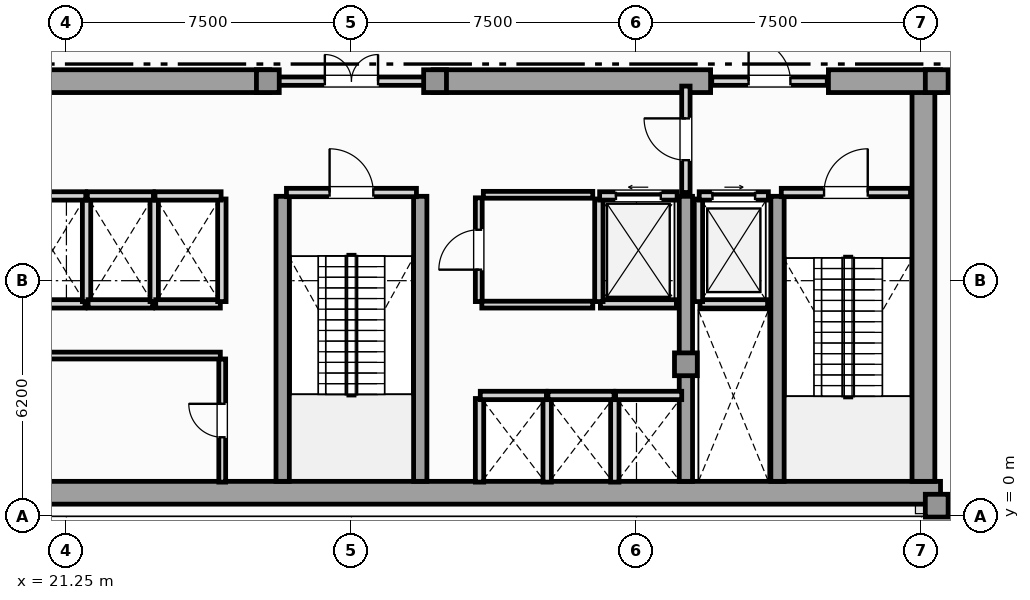
"""IFC4 building model, lengths in metres.
Left out: names, types, materials, properties, quantities, classifications, styles, units other than length and angle.
Written with IfcOpenShell. Run it as: python <this file> out.ifc"""

import sys

from ifc_helpers import new_model, si_unit, direction, frame, frame_2d, origin, origin_2d, place, context, subcontext, project, spatial, rectangle, extrude, element, fill, save


model = new_model("IFC4")
c1 = context("Model", 3, precision=1e-05, world=origin(), true_north=direction((0.0, 1.0)))
c2 = subcontext(c1, "Body", "Model", "MODEL_VIEW")
j1 = project(units=[si_unit("LENGTHUNIT", "METRE"), si_unit("PLANEANGLEUNIT", "RADIAN")], contexts=[c1])
p1 = place(None, origin())
s1 = spatial("IfcSite", under=j1, at=p1, CompositionType="ELEMENT")
p2 = place(p1, origin())
s2 = spatial("IfcBuilding", under=s1, at=p2, CompositionType="ELEMENT")
p3 = place(p2, frame((0.0, 0.0, 246.5)))
s3 = spatial("IfcBuildingStorey", under=s2, at=p3, CompositionType="ELEMENT", Elevation=246.5)
p4 = place(p3, frame((13.25, 0.62, 0.0), z_axis=(0.0, 0.0, 1.0), x_axis=(1.0, 0.0, 0.0)))
e1 = element("IfcWall", 1, at=p4, inside=s3, PredefinedType="SHEAR", context=c2, shape_type="SweptSolid", body=[
    extrude(rectangle(XDim=31.0, YDim=0.6, at=frame_2d((15.5, 0.0))), origin(), (0.0, 0.0, 1.0), 4.92),
])
p5 = place(p3, frame((43.8, 0.92, 0.0), z_axis=(0.0, 0.0, 1.0), x_axis=(0.0, 1.0, 0.0)))
e2 = element("IfcWall", 2, at=p5, inside=s3, PredefinedType="SHEAR", context=c2, shape_type="SweptSolid", body=[
    extrude(rectangle(XDim=10.53, YDim=0.6, at=frame_2d((5.265, 0.0))), origin(), (0.0, 0.0, 1.0), 4.92),
])
for number, where, z_axis, x_axis in (
    (3, (19.3, 11.45, 0.0), (0.0, 0.0, 1.0), (1.0, 0.0, 0.0)),
    (4, (30.9, 11.45, 0.0), (0.0, 0.0, 1.0), (1.0, 0.0, 0.0)),
):
    element("IfcWall", number, at=place(p3, frame(where, z_axis=z_axis, x_axis=x_axis)), inside=s3, PredefinedType="SHEAR", context=c2, shape_type="SweptSolid", body=[
        extrude(rectangle(XDim=7.3, YDim=0.6, at=frame_2d((3.65, 0.0))), origin(), (0.0, 0.0, 1.0), 4.92),
    ])
p6 = place(p3, frame((41.3, 11.45, 0.0), z_axis=(0.0, 0.0, 1.0), x_axis=(1.0, 0.0, 0.0)))
e5 = element("IfcWall", 5, at=p6, inside=s3, PredefinedType="SHEAR", context=c2, shape_type="SweptSolid", body=[
    extrude(rectangle(XDim=2.95, YDim=0.6, at=frame_2d((1.475, 0.0))), origin(), (0.0, 0.0, 1.0), 4.92),
])
for number, where, z_axis, x_axis in (
    (6, (26.94, 0.92, 0.0), (0.0, 0.0, 1.0), (0.0, 1.0, 0.0)),
    (7, (30.56, 0.92, 0.0), (0.0, 0.0, 1.0), (0.0, 1.0, 0.0)),
    (8, (37.55, 0.92, 0.0), (0.0, 0.0, 1.0), (0.0, 1.0, 0.0)),
    (9, (39.96, 0.92, 0.0), (0.0, 0.0, 1.0), (0.0, 1.0, 0.0)),
):
    element("IfcWall", number, at=place(p3, frame(where, z_axis=z_axis, x_axis=x_axis)), inside=s3, PredefinedType="SHEAR", context=c2, shape_type="SweptSolid", body=[
        extrude(rectangle(XDim=7.5, YDim=0.35, at=frame_2d((3.75, 0.0))), origin(), (0.0, 0.0, 1.0), 4.92),
    ])
for number, where, z_axis, x_axis in (
    (10, (44.15, 0.28, 0.0), (0.0, 0.0, 1.0), (1.0, 0.0, 0.0)),
    (11, (44.15, 11.45, 0.0), (0.0, 0.0, 1.0), (1.0, 0.0, 0.0)),
    (12, (37.55, 4.0, 0.0), (0.0, 0.0, 1.0), (1.0, 0.0, 0.0)),
    (13, (26.55, 11.45, 0.0), (0.0, 0.0, 1.0), (1.0, 0.0, 0.0)),
    (14, (30.95, 11.45, 0.0), (0.0, 0.0, 1.0), (1.0, 0.0, 0.0)),
):
    element("IfcColumn", number, at=place(p3, frame(where, z_axis=z_axis, x_axis=x_axis)), inside=s3, PredefinedType="COLUMN", context=c2, shape_type="SweptSolid", body=[
        extrude(rectangle(XDim=0.6, YDim=0.6, at=origin_2d()), origin(), (0.0, 0.0, 1.0), 5.2),
    ])
p7 = place(p3, frame((44.25, 0.18, 0.0), z_axis=(0.0, 0.0, 1.0), x_axis=(1.0, 0.0, 0.0)))
e15 = element("IfcWall", 15, at=p7, inside=s3, PredefinedType="SOLIDWALL", context=c2, shape_type="SweptSolid", body=[
    extrude(rectangle(XDim=2.226, YDim=0.26, at=frame_2d((1.113, 0.0))), origin(), (0.0, 0.0, 1.0), 4.92),
])
p8 = place(p3, frame((37.92, 5.59, 0.0), z_axis=(0.0, 0.0, 1.0), x_axis=(1.0, 0.0, 0.0)))
e16 = element("IfcWall", 16, at=p8, inside=s3, PredefinedType="SOLIDWALL", context=c2, shape_type="SweptSolid", body=[
    extrude(rectangle(XDim=1.78, YDim=0.22, at=frame_2d((0.89, 0.0))), origin(), (0.0, 0.0, 1.0), 4.92),
])
p9 = place(p3, frame((37.88, 5.65, 0.0), z_axis=(0.0, 0.0, 1.0), x_axis=(0.0, 1.0, 0.0)))
e17 = element("IfcWall", 17, at=p9, inside=s3, PredefinedType="SOLIDWALL", context=c2, shape_type="SweptSolid", body=[
    extrude(rectangle(XDim=2.7, YDim=0.22, at=frame_2d((1.35, 0.0))), origin(), (0.0, 0.0, 1.0), 4.92),
])
p10 = place(p3, frame((37.9, 8.43, 0.0), z_axis=(0.0, 0.0, 1.0), x_axis=(1.0, 0.0, 0.0)))
e18 = element("IfcWall", 18, at=p10, inside=s3, PredefinedType="SOLIDWALL", context=c2, shape_type="SweptSolid", body=[
    extrude(rectangle(XDim=1.82, YDim=0.22, at=frame_2d((0.91, 0.0))), origin(), (0.0, 0.0, 1.0), 4.92),
])
p11 = place(p10, frame((0.35, 0.0, 0.0)))
e19 = element("IfcOpeningElement", 19, at=p11, cuts=e18, PredefinedType="OPENING", context=c2, shape_type="SweptSolid", body=[
    extrude(rectangle(XDim=1.12, YDim=2.25, at=frame_2d((0.56, 1.125))), frame((0.0, 0.12, 0.0), z_axis=(0.0, -1.0, 0.0), x_axis=(1.0, 0.0, 0.0)), (0.0, 0.0, 1.0), 0.24),
])
p12 = place(p3, frame((35.3, 5.59, 0.0), z_axis=(0.0, 0.0, 1.0), x_axis=(1.0, 0.0, 0.0)))
e20 = element("IfcWall", 20, at=p12, inside=s3, PredefinedType="SOLIDWALL", context=c2, shape_type="SweptSolid", body=[
    extrude(rectangle(XDim=2.0, YDim=0.22, at=frame_2d((1.0, 0.0))), origin(), (0.0, 0.0, 1.0), 4.92),
])
p13 = place(p3, frame((35.26, 5.65, 0.0), z_axis=(0.0, 0.0, 1.0), x_axis=(0.0, 1.0, 0.0)))
e21 = element("IfcWall", 21, at=p13, inside=s3, PredefinedType="SOLIDWALL", context=c2, shape_type="SweptSolid", body=[
    extrude(rectangle(XDim=2.7, YDim=0.22, at=frame_2d((1.35, 0.0))), origin(), (0.0, 0.0, 1.0), 4.92),
])
p14 = place(p3, frame((35.28, 8.43, 0.0), z_axis=(0.0, 0.0, 1.0), x_axis=(1.0, 0.0, 0.0)))
e22 = element("IfcWall", 22, at=p14, inside=s3, PredefinedType="SOLIDWALL", context=c2, shape_type="SweptSolid", body=[
    extrude(rectangle(XDim=2.04, YDim=0.22, at=frame_2d((1.02, 0.0))), origin(), (0.0, 0.0, 1.0), 4.92),
])
p15 = place(p14, frame((0.43, 0.0, 0.0)))
e23 = element("IfcOpeningElement", 23, at=p15, cuts=e22, PredefinedType="OPENING", context=c2, shape_type="SweptSolid", body=[
    extrude(rectangle(XDim=1.18, YDim=2.2, at=frame_2d((0.59, 1.1))), frame((0.0, 0.12, 0.0), z_axis=(0.0, -1.0, 0.0), x_axis=(1.0, 0.0, 0.0)), (0.0, 0.0, 1.0), 0.24),
])
for number, where, z_axis, x_axis in (
    (24, (32.12, 0.9, 0.0), (0.0, 0.0, 1.0), (0.0, 1.0, 0.0)),
    (25, (33.9, 0.9, 0.0), (0.0, 0.0, 1.0), (0.0, 1.0, 0.0)),
):
    element("IfcWall", number, at=place(p3, frame(where, z_axis=z_axis, x_axis=x_axis)), inside=s3, PredefinedType="SOLIDWALL", context=c2, shape_type="SweptSolid", body=[
        extrude(rectangle(XDim=2.2, YDim=0.22, at=frame_2d((1.1, 0.0))), origin(), (0.0, 0.0, 1.0), 4.92),
    ])
p16 = place(p3, frame((32.14, 3.18, 0.0), z_axis=(0.0, 0.0, 1.0), x_axis=(1.0, 0.0, 0.0)))
e26 = element("IfcWall", 26, at=p16, inside=s3, PredefinedType="SOLIDWALL", context=c2, shape_type="SweptSolid", body=[
    extrude(rectangle(XDim=1.74, YDim=0.22, at=frame_2d((0.87, 0.0))), origin(), (0.0, 0.0, 1.0), 4.92),
])
p17 = place(p3, frame((35.68, 0.9, 0.0), z_axis=(0.0, 0.0, 1.0), x_axis=(0.0, 1.0, 0.0)))
e27 = element("IfcWall", 27, at=p17, inside=s3, PredefinedType="SOLIDWALL", context=c2, shape_type="SweptSolid", body=[
    extrude(rectangle(XDim=2.2, YDim=0.22, at=frame_2d((1.1, 0.0))), origin(), (0.0, 0.0, 1.0), 4.92),
])
for number, where, z_axis, x_axis in (
    (28, (33.92, 3.18, 0.0), (0.0, 0.0, 1.0), (1.0, 0.0, 0.0)),
    (29, (35.7, 3.18, 0.0), (0.0, 0.0, 1.0), (1.0, 0.0, 0.0)),
):
    element("IfcWall", number, at=place(p3, frame(where, z_axis=z_axis, x_axis=x_axis)), inside=s3, PredefinedType="SOLIDWALL", context=c2, shape_type="SweptSolid", body=[
        extrude(rectangle(XDim=1.74, YDim=0.22, at=frame_2d((0.87, 0.0))), origin(), (0.0, 0.0, 1.0), 4.92),
    ])
p18 = place(p3, frame((20.04, 5.59, 0.0), z_axis=(0.0, 0.0, 1.0), x_axis=(1.0, 0.0, 0.0)))
e30 = element("IfcWall", 30, at=p18, inside=s3, PredefinedType="SOLIDWALL", context=c2, shape_type="SweptSolid", body=[
    extrude(rectangle(XDim=1.7, YDim=0.22, at=frame_2d((0.85, 0.0))), origin(), (0.0, 0.0, 1.0), 4.92),
])
p19 = place(p3, frame((21.78, 5.65, 0.0), z_axis=(0.0, 0.0, 1.0), x_axis=(0.0, 1.0, 0.0)))
e31 = element("IfcWall", 31, at=p19, inside=s3, PredefinedType="SOLIDWALL", context=c2, shape_type="SweptSolid", body=[
    extrude(rectangle(XDim=2.7, YDim=0.22, at=frame_2d((1.35, 0.0))), origin(), (0.0, 0.0, 1.0), 4.92),
])
p20 = place(p3, frame((20.02, 8.43, 0.0), z_axis=(0.0, 0.0, 1.0), x_axis=(1.0, 0.0, 0.0)))
e32 = element("IfcWall", 32, at=p20, inside=s3, PredefinedType="SOLIDWALL", context=c2, shape_type="SweptSolid", body=[
    extrude(rectangle(XDim=1.74, YDim=0.22, at=frame_2d((0.87, 0.0))), origin(), (0.0, 0.0, 1.0), 4.92),
])
p21 = place(p3, frame((21.82, 5.59, 0.0), z_axis=(0.0, 0.0, 1.0), x_axis=(1.0, 0.0, 0.0)))
e33 = element("IfcWall", 33, at=p21, inside=s3, PredefinedType="SOLIDWALL", context=c2, shape_type="SweptSolid", body=[
    extrude(rectangle(XDim=1.7, YDim=0.22, at=frame_2d((0.85, 0.0))), origin(), (0.0, 0.0, 1.0), 4.92),
])
p22 = place(p3, frame((23.56, 5.65, 0.0), z_axis=(0.0, 0.0, 1.0), x_axis=(0.0, 1.0, 0.0)))
e34 = element("IfcWall", 34, at=p22, inside=s3, PredefinedType="SOLIDWALL", context=c2, shape_type="SweptSolid", body=[
    extrude(rectangle(XDim=2.7, YDim=0.22, at=frame_2d((1.35, 0.0))), origin(), (0.0, 0.0, 1.0), 4.92),
])
p23 = place(p3, frame((21.8, 8.43, 0.0), z_axis=(0.0, 0.0, 1.0), x_axis=(1.0, 0.0, 0.0)))
e35 = element("IfcWall", 35, at=p23, inside=s3, PredefinedType="SOLIDWALL", context=c2, shape_type="SweptSolid", body=[
    extrude(rectangle(XDim=1.74, YDim=0.22, at=frame_2d((0.87, 0.0))), origin(), (0.0, 0.0, 1.0), 4.92),
])
p24 = place(p3, frame((23.6, 5.59, 0.0), z_axis=(0.0, 0.0, 1.0), x_axis=(1.0, 0.0, 0.0)))
e36 = element("IfcWall", 36, at=p24, inside=s3, PredefinedType="SOLIDWALL", context=c2, shape_type="SweptSolid", body=[
    extrude(rectangle(XDim=1.7, YDim=0.22, at=frame_2d((0.85, 0.0))), origin(), (0.0, 0.0, 1.0), 4.92),
])
p25 = place(p3, frame((25.34, 5.65, 0.0), z_axis=(0.0, 0.0, 1.0), x_axis=(0.0, 1.0, 0.0)))
e37 = element("IfcWall", 37, at=p25, inside=s3, PredefinedType="SOLIDWALL", context=c2, shape_type="SweptSolid", body=[
    extrude(rectangle(XDim=2.7, YDim=0.22, at=frame_2d((1.35, 0.0))), origin(), (0.0, 0.0, 1.0), 4.92),
])
p26 = place(p3, frame((23.58, 8.43, 0.0), z_axis=(0.0, 0.0, 1.0), x_axis=(1.0, 0.0, 0.0)))
e38 = element("IfcWall", 38, at=p26, inside=s3, PredefinedType="SOLIDWALL", context=c2, shape_type="SweptSolid", body=[
    extrude(rectangle(XDim=1.74, YDim=0.22, at=frame_2d((0.87, 0.0))), origin(), (0.0, 0.0, 1.0), 4.92),
])
p27 = place(p3, frame((40.06, 8.52, 0.0), z_axis=(0.0, 0.0, 1.0), x_axis=(1.0, 0.0, 0.0)))
e39 = element("IfcWall", 39, at=p27, inside=s3, PredefinedType="SOLIDWALL", context=c2, shape_type="SweptSolid", body=[
    extrude(rectangle(XDim=3.4, YDim=0.22, at=frame_2d((1.7, 0.0))), origin(), (0.0, 0.0, 1.0), 4.92),
])
p28 = place(p27, frame((1.125, 0.0, 0.0)))
e40 = element("IfcOpeningElement", 40, at=p28, cuts=e39, PredefinedType="OPENING", context=c2, shape_type="SweptSolid", body=[
    extrude(rectangle(XDim=1.15, YDim=2.2, at=frame_2d((0.575, 1.1))), frame((0.0, 0.12, 0.0), z_axis=(0.0, -1.0, 0.0), x_axis=(1.0, 0.0, 0.0)), (0.0, 0.0, 1.0), 0.24),
])
p29 = place(p3, frame((27.04, 8.52, 0.0), z_axis=(0.0, 0.0, 1.0), x_axis=(1.0, 0.0, 0.0)))
e41 = element("IfcWall", 41, at=p29, inside=s3, PredefinedType="SOLIDWALL", context=c2, shape_type="SweptSolid", body=[
    extrude(rectangle(XDim=3.42, YDim=0.22, at=frame_2d((1.71, 0.0))), origin(), (0.0, 0.0, 1.0), 4.92),
])
p30 = place(p29, frame((1.135, 0.0, 0.0)))
e42 = element("IfcOpeningElement", 42, at=p30, cuts=e41, PredefinedType="OPENING", context=c2, shape_type="SweptSolid", body=[
    extrude(rectangle(XDim=1.15, YDim=2.2, at=frame_2d((0.575, 1.1))), frame((0.0, 0.12, 0.0), z_axis=(0.0, -1.0, 0.0), x_axis=(1.0, 0.0, 0.0)), (0.0, 0.0, 1.0), 0.24),
])
p31 = place(p3, frame((37.55, 8.52, 0.0), z_axis=(0.0, 0.0, 1.0), x_axis=(0.0, 1.0, 0.0)))
e43 = element("IfcWall", 43, at=p31, inside=s3, PredefinedType="SOLIDWALL", context=c2, shape_type="SweptSolid", body=[
    extrude(rectangle(XDim=2.8, YDim=0.22, at=frame_2d((1.4, 0.0))), origin(), (0.0, 0.0, 1.0), 4.375),
])
p32 = place(p31, frame((0.85, 0.0, 0.0)))
e44 = element("IfcOpeningElement", 44, at=p32, cuts=e43, PredefinedType="OPENING", context=c2, shape_type="SweptSolid", body=[
    extrude(rectangle(XDim=1.1, YDim=2.2, at=frame_2d((0.55, 1.1))), frame((0.0, 0.12, 0.0), z_axis=(0.0, -1.0, 0.0), x_axis=(1.0, 0.0, 0.0)), (0.0, 0.0, 1.0), 0.24),
])
p33 = place(p3, frame((26.63, 11.45, 0.0), z_axis=(0.0, 0.0, 1.0), x_axis=(1.0, 0.0, 0.0)))
e45 = element("IfcWall", 45, at=p33, inside=s3, PredefinedType="SOLIDWALL", context=c2, shape_type="SweptSolid", body=[
    extrude(rectangle(XDim=4.24, YDim=0.22, at=frame_2d((2.12, 0.0))), origin(), (0.0, 0.0, 1.0), 4.92),
])
p34 = place(p33, frame((1.42, 0.0, 0.0)))
e46 = element("IfcOpeningElement", 46, at=p34, cuts=e45, PredefinedType="OPENING", context=c2, shape_type="SweptSolid", body=[
    extrude(rectangle(XDim=1.4, YDim=2.2, at=frame_2d((0.7, 1.1))), frame((0.0, 0.12, 0.0), z_axis=(0.0, -1.0, 0.0), x_axis=(1.0, 0.0, 0.0)), (0.0, 0.0, 1.0), 0.24),
])
p35 = place(p3, frame((38.23, 11.45, 0.0), z_axis=(0.0, 0.0, 1.0), x_axis=(1.0, 0.0, 0.0)))
e47 = element("IfcWall", 47, at=p35, inside=s3, PredefinedType="SOLIDWALL", context=c2, shape_type="SweptSolid", body=[
    extrude(rectangle(XDim=3.04, YDim=0.22, at=frame_2d((1.52, 0.0))), origin(), (0.0, 0.0, 1.0), 4.92),
])
p36 = place(p35, frame((0.97, 0.0, 0.0)))
e48 = element("IfcOpeningElement", 48, at=p36, cuts=e47, PredefinedType="OPENING", context=c2, shape_type="SweptSolid", body=[
    extrude(rectangle(XDim=1.1, YDim=2.2, at=frame_2d((0.55, 1.1))), frame((0.0, 0.12, 0.0), z_axis=(0.0, -1.0, 0.0), x_axis=(1.0, 0.0, 0.0)), (0.0, 0.0, 1.0), 0.24),
])
p37 = place(p3, frame((25.35, 0.9, 0.0), z_axis=(0.0, 0.0, 1.0), x_axis=(0.0, 1.0, 0.0)))
e49 = element("IfcWall", 49, at=p37, inside=s3, PredefinedType="PARTITIONING", context=c2, shape_type="SweptSolid", body=[
    extrude(rectangle(XDim=3.24, YDim=0.18, at=frame_2d((1.62, 0.0))), origin(), (0.0, 0.0, 1.0), 4.92),
])
p38 = place(p37, frame((1.18, 0.0, 0.0)))
e50 = element("IfcOpeningElement", 50, at=p38, cuts=e49, PredefinedType="OPENING", context=c2, shape_type="SweptSolid", body=[
    extrude(rectangle(XDim=0.88, YDim=2.05, at=frame_2d((0.44, 1.025))), frame((0.0, 0.1, 0.0), z_axis=(0.0, -1.0, 0.0), x_axis=(1.0, 0.0, 0.0)), (0.0, 0.0, 1.0), 0.2),
])
p39 = place(p3, frame((19.98, 4.23, 0.0), z_axis=(0.0, 0.0, 1.0), x_axis=(1.0, 0.0, 0.0)))
e51 = element("IfcWall", 51, at=p39, inside=s3, PredefinedType="PARTITIONING", context=c2, shape_type="SweptSolid", body=[
    extrude(rectangle(XDim=5.32, YDim=0.18, at=frame_2d((2.66, 0.0))), origin(), (0.0, 0.0, 1.0), 4.92),
])
p40 = place(p3, frame((32.1, 5.65, 0.0), z_axis=(0.0, 0.0, 1.0), x_axis=(0.0, 1.0, 0.0)))
e52 = element("IfcWall", 52, at=p40, inside=s3, PredefinedType="PARTITIONING", context=c2, shape_type="SweptSolid", body=[
    extrude(rectangle(XDim=2.73, YDim=0.18, at=frame_2d((1.365, 0.0))), origin(), (0.0, 0.0, 1.0), 4.92),
])
p41 = place(p40, frame((0.84, 0.0, 0.0)))
e53 = element("IfcOpeningElement", 53, at=p41, cuts=e52, PredefinedType="OPENING", context=c2, shape_type="SweptSolid", body=[
    extrude(rectangle(XDim=1.05, YDim=2.15, at=frame_2d((0.525, 1.075))), frame((0.0, 0.1, 0.0), z_axis=(0.0, -1.0, 0.0), x_axis=(1.0, 0.0, 0.0)), (0.0, 0.0, 1.0), 0.2),
])
p42 = place(p3, frame((32.22, 8.46, 0.0), z_axis=(0.0, 0.0, 1.0), x_axis=(1.0, 0.0, 0.0)))
e54 = element("IfcWall", 54, at=p42, inside=s3, PredefinedType="PARTITIONING", context=c2, shape_type="SweptSolid", body=[
    extrude(rectangle(XDim=2.88, YDim=0.18, at=frame_2d((1.44, 0.0))), origin(), (0.0, 0.0, 1.0), 4.92),
])
p43 = place(p3, frame((32.18, 5.57, 0.0), z_axis=(0.0, 0.0, 1.0), x_axis=(1.0, 0.0, 0.0)))
e55 = element("IfcWall", 55, at=p43, inside=s3, PredefinedType="PARTITIONING", context=c2, shape_type="SweptSolid", body=[
    extrude(rectangle(XDim=2.92, YDim=0.18, at=frame_2d((1.46, 0.0))), origin(), (0.0, 0.0, 1.0), 4.92),
])
p44 = place(p11, origin())
e56 = element("IfcDoor", 56, at=p44, inside=s3, OperationType="SLIDING_TO_RIGHT", PredefinedType="DOOR", context=c2, shape_type="SweptSolid", body=[
    extrude(rectangle(XDim=1.12, YDim=2.25, at=frame_2d((0.56, 1.125))), frame((0.0, 0.025, 0.0), z_axis=(0.0, -1.0, 0.0), x_axis=(1.0, 0.0, 0.0)), (0.0, 0.0, 1.0), 0.05),
])
fill(e19, e56)
p45 = place(p15, origin())
e57 = element("IfcDoor", 57, at=p45, inside=s3, OperationType="SLIDING_TO_LEFT", PredefinedType="DOOR", context=c2, shape_type="SweptSolid", body=[
    extrude(rectangle(XDim=1.18, YDim=2.2, at=frame_2d((0.59, 1.1))), frame((0.0, 0.025, 0.0), z_axis=(0.0, -1.0, 0.0), x_axis=(1.0, 0.0, 0.0)), (0.0, 0.0, 1.0), 0.05),
])
fill(e23, e57)
p46 = place(p28, origin())
e58 = element("IfcDoor", 58, at=p46, inside=s3, OperationType="SINGLE_SWING_RIGHT", PredefinedType="DOOR", context=c2, shape_type="SweptSolid", body=[
    extrude(rectangle(XDim=1.15, YDim=2.2, at=frame_2d((0.575, 1.1))), frame((0.0, 0.025, 0.0), z_axis=(0.0, -1.0, 0.0), x_axis=(1.0, 0.0, 0.0)), (0.0, 0.0, 1.0), 0.05),
])
fill(e40, e58)
p47 = place(p30, origin())
e59 = element("IfcDoor", 59, at=p47, inside=s3, OperationType="SINGLE_SWING_LEFT", PredefinedType="DOOR", context=c2, shape_type="SweptSolid", body=[
    extrude(rectangle(XDim=1.15, YDim=2.2, at=frame_2d((0.575, 1.1))), frame((0.0, 0.025, 0.0), z_axis=(0.0, -1.0, 0.0), x_axis=(1.0, 0.0, 0.0)), (0.0, 0.0, 1.0), 0.05),
])
fill(e42, e59)
p48 = place(p32, origin())
e60 = element("IfcDoor", 60, at=p48, inside=s3, OperationType="SINGLE_SWING_RIGHT", PredefinedType="DOOR", context=c2, shape_type="SweptSolid", body=[
    extrude(rectangle(XDim=1.1, YDim=2.2, at=frame_2d((0.55, 1.1))), frame((0.0, 0.025, 0.0), z_axis=(0.0, -1.0, 0.0), x_axis=(1.0, 0.0, 0.0)), (0.0, 0.0, 1.0), 0.05),
])
fill(e44, e60)
p49 = place(p34, origin())
e61 = element("IfcDoor", 61, at=p49, inside=s3, OperationType="DOUBLE_DOOR_SINGLE_SWING", PredefinedType="DOOR", context=c2, shape_type="SweptSolid", body=[
    extrude(rectangle(XDim=1.4, YDim=2.2, at=frame_2d((0.7, 1.1))), frame((0.0, 0.025, 0.0), z_axis=(0.0, -1.0, 0.0), x_axis=(1.0, 0.0, 0.0)), (0.0, 0.0, 1.0), 0.05),
])
fill(e46, e61)
p50 = place(p36, origin())
e62 = element("IfcDoor", 62, at=p50, inside=s3, OperationType="SINGLE_SWING_LEFT", PredefinedType="DOOR", context=c2, shape_type="SweptSolid", body=[
    extrude(rectangle(XDim=1.1, YDim=2.2, at=frame_2d((0.55, 1.1))), frame((0.0, 0.025, 0.0), z_axis=(0.0, -1.0, 0.0), x_axis=(1.0, 0.0, 0.0)), (0.0, 0.0, 1.0), 0.05),
])
fill(e48, e62)
p51 = place(p38, origin())
e63 = element("IfcDoor", 63, at=p51, inside=s3, OperationType="SINGLE_SWING_RIGHT", PredefinedType="DOOR", context=c2, shape_type="SweptSolid", body=[
    extrude(rectangle(XDim=0.88, YDim=2.05, at=frame_2d((0.44, 1.025))), frame((0.0, 0.025, 0.0), z_axis=(0.0, -1.0, 0.0), x_axis=(1.0, 0.0, 0.0)), (0.0, 0.0, 1.0), 0.05),
])
fill(e50, e63)
p52 = place(p41, origin())
e64 = element("IfcDoor", 64, at=p52, inside=s3, OperationType="SINGLE_SWING_LEFT", PredefinedType="DOOR", context=c2, shape_type="SweptSolid", body=[
    extrude(rectangle(XDim=1.05, YDim=2.15, at=frame_2d((0.525, 1.075))), frame((0.0, 0.025, 0.0), z_axis=(0.0, -1.0, 0.0), x_axis=(1.0, 0.0, 0.0)), (0.0, 0.0, 1.0), 0.05),
])
fill(e53, e64)
save(model, sys.argv[1])
